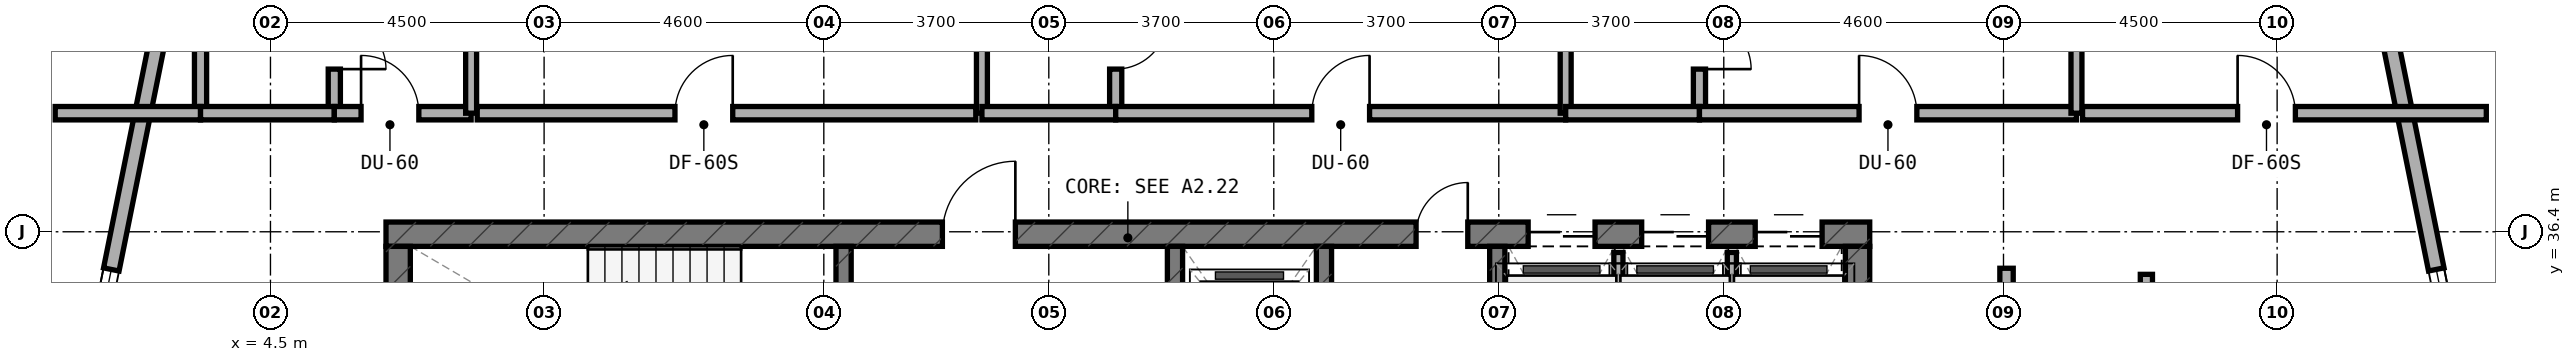
"""IFC4 building model, lengths in metres.
Left out: names, types, materials, properties, quantities, classifications, styles, units other than length and angle.
Written with IfcOpenShell. Run it as: python <this file> out.ifc"""

import sys

from ifc_helpers import new_model, si_unit, direction, frame, frame_2d, origin, place, context, subcontext, project, spatial, rectangle, extrude, element, fill, save


model = new_model("IFC4")
c1 = context("Model", 3, precision=1e-05, world=origin(), true_north=direction((0.0, 1.0)))
c2 = subcontext(c1, "Body", "Model", "MODEL_VIEW")
j1 = project(units=[si_unit("LENGTHUNIT", "METRE"), si_unit("PLANEANGLEUNIT", "RADIAN")], contexts=[c1])
p1 = place(None, origin())
s1 = spatial("IfcSite", under=j1, at=p1, CompositionType="ELEMENT")
p2 = place(p1, origin())
s2 = spatial("IfcBuilding", under=s1, at=p2, CompositionType="ELEMENT")
p3 = place(p2, frame((0.0, 0.0, 95.0)))
s3 = spatial("IfcBuildingStorey", under=s2, at=p3, CompositionType="ELEMENT", Elevation=95.0)
p4 = place(p3, frame((6.4, 36.36, 0.0), z_axis=(0.0, 0.0, 1.0), x_axis=(1.0, 0.0, 0.0)))
e1 = element("IfcWall", 1, at=p4, inside=s3, PredefinedType="SHEAR", context=c2, shape_type="SweptSolid", body=[
    extrude(rectangle(XDim=24.4, YDim=0.4, at=frame_2d((12.2, 0.0))), origin(), (0.0, 0.0, 1.0), 3.5),
])
p5 = place(p4, frame((9.15, 0.0, 0.0)))
e2 = element("IfcOpeningElement", 2, at=p5, cuts=e1, PredefinedType="OPENING", context=c2, shape_type="SweptSolid", body=[
    extrude(rectangle(XDim=1.2, YDim=2.15, at=frame_2d((0.6, 1.075))), frame((0.0, 0.21, 0.0), z_axis=(0.0, -1.0, 0.0), x_axis=(1.0, 0.0, 0.0)), (0.0, 0.0, 1.0), 0.42),
])
p6 = place(p4, frame((16.94, 0.0, 0.0)))
e3 = element("IfcOpeningElement", 3, at=p6, cuts=e1, PredefinedType="OPENING", context=c2, shape_type="SweptSolid", body=[
    extrude(rectangle(XDim=0.85, YDim=2.1, at=frame_2d((0.425, 1.05))), frame((0.0, 0.21, 0.0), z_axis=(0.0, -1.0, 0.0), x_axis=(1.0, 0.0, 0.0)), (0.0, 0.0, 1.0), 0.42),
])
p7 = place(p4, frame((18.783, 0.0, 0.0)))
e4 = element("IfcOpeningElement", 4, at=p7, cuts=e1, PredefinedType="OPENING", context=c2, shape_type="SweptSolid", body=[
    extrude(rectangle(XDim=1.1, YDim=2.15, at=frame_2d((0.55, 1.075))), frame((0.0, 0.21, 0.0), z_axis=(0.0, -1.0, 0.0), x_axis=(1.0, 0.0, 0.0)), (0.0, 0.0, 1.0), 0.42),
])
p8 = place(p4, frame((20.65, 0.0, 0.0)))
e5 = element("IfcOpeningElement", 5, at=p8, cuts=e1, PredefinedType="OPENING", context=c2, shape_type="SweptSolid", body=[
    extrude(rectangle(XDim=1.1, YDim=2.15, at=frame_2d((0.55, 1.075))), frame((0.0, 0.21, 0.0), z_axis=(0.0, -1.0, 0.0), x_axis=(1.0, 0.0, 0.0)), (0.0, 0.0, 1.0), 0.42),
])
p9 = place(p4, frame((22.517, 0.0, 0.0)))
e6 = element("IfcOpeningElement", 6, at=p9, cuts=e1, PredefinedType="OPENING", context=c2, shape_type="SweptSolid", body=[
    extrude(rectangle(XDim=1.1, YDim=2.15, at=frame_2d((0.55, 1.075))), frame((0.0, 0.21, 0.0), z_axis=(0.0, -1.0, 0.0), x_axis=(1.0, 0.0, 0.0)), (0.0, 0.0, 1.0), 0.42),
])
for number, where, z_axis, x_axis in (
    (7, (6.6, 33.0, 0.0), (0.0, 0.0, 1.0), (0.0, 1.0, 0.0)),
    (8, (30.6, 33.0, 0.0), (0.0, 0.0, 1.0), (0.0, 1.0, 0.0)),
):
    element("IfcWall", number, at=place(p3, frame(where, z_axis=z_axis, x_axis=x_axis)), inside=s3, PredefinedType="SHEAR", context=c2, shape_type="SweptSolid", body=[
        extrude(rectangle(XDim=3.16, YDim=0.4, at=frame_2d((1.58, 0.0))), origin(), (0.0, 0.0, 1.0), 3.5),
    ])
p10 = place(p3, frame((13.925, 33.0, 0.0), z_axis=(0.0, 0.0, 1.0), x_axis=(0.0, 1.0, 0.0)))
e9 = element("IfcWall", 9, at=p10, inside=s3, PredefinedType="STANDARD", context=c2, shape_type="SweptSolid", body=[
    extrude(rectangle(XDim=3.16, YDim=0.25, at=frame_2d((1.58, 0.0))), origin(), (0.0, 0.0, 1.0), 3.22),
])
p11 = place(p10, frame((0.98, 0.0, 0.0)))
e10 = element("IfcOpeningElement", 10, at=p11, cuts=e9, PredefinedType="OPENING", context=c2, shape_type="SweptSolid", body=[
    extrude(rectangle(XDim=1.1, YDim=2.15, at=frame_2d((0.55, 1.075))), frame((0.0, 0.135, 0.0), z_axis=(0.0, -1.0, 0.0), x_axis=(1.0, 0.0, 0.0)), (0.0, 0.0, 1.0), 0.27),
])
p12 = place(p3, frame((19.375, 33.0, 0.0), z_axis=(0.0, 0.0, 1.0), x_axis=(0.0, 1.0, 0.0)))
e11 = element("IfcWall", 11, at=p12, inside=s3, PredefinedType="STANDARD", context=c2, shape_type="SweptSolid", body=[
    extrude(rectangle(XDim=3.16, YDim=0.25, at=frame_2d((1.58, 0.0))), origin(), (0.0, 0.0, 1.0), 3.22),
])
p13 = place(p12, frame((0.98, 0.0, 0.0)))
e12 = element("IfcOpeningElement", 12, at=p13, cuts=e11, PredefinedType="OPENING", context=c2, shape_type="SweptSolid", body=[
    extrude(rectangle(XDim=1.1, YDim=2.15, at=frame_2d((0.55, 1.075))), frame((0.0, 0.135, 0.0), z_axis=(0.0, -1.0, 0.0), x_axis=(1.0, 0.0, 0.0)), (0.0, 0.0, 1.0), 0.27),
])
for number, where, z_axis, x_axis in (
    (13, (21.825, 33.0, 0.0), (0.0, 0.0, 1.0), (0.0, 1.0, 0.0)),
    (14, (24.675, 33.0, 0.0), (0.0, 0.0, 1.0), (0.0, 1.0, 0.0)),
):
    element("IfcWall", number, at=place(p3, frame(where, z_axis=z_axis, x_axis=x_axis)), inside=s3, PredefinedType="STANDARD", context=c2, shape_type="SweptSolid", body=[
        extrude(rectangle(XDim=3.16, YDim=0.25, at=frame_2d((1.58, 0.0))), origin(), (0.0, 0.0, 1.0), 3.22),
    ])
p14 = place(p3, frame((41.084, 30.98, 0.0), z_axis=(0.0, 0.0, 1.0), x_axis=(-0.197435082048, 0.980315963543, 0.0)))
e15 = element("IfcWall", 15, at=p14, inside=s3, PredefinedType="STANDARD", context=c2, shape_type="SweptSolid", body=[
    extrude(rectangle(XDim=9.183, YDim=0.26, at=frame_2d((4.591, 0.0))), origin(), (0.0, 0.0, 1.0), 3.22),
])
p15 = place(p14, frame((2.497, 0.0, 0.8)))
e16 = element("IfcOpeningElement", 16, at=p15, cuts=e15, PredefinedType="OPENING", context=c2, shape_type="SweptSolid", body=[
    extrude(rectangle(XDim=2.4, YDim=1.6, at=frame_2d((1.2, 0.8))), frame((0.0, 0.14, 0.0), z_axis=(0.0, -1.0, 0.0), x_axis=(1.0, 0.0, 0.0)), (0.0, 0.0, 1.0), 0.28),
])
p16 = place(p3, frame((2.729, 39.982, 0.0), z_axis=(0.0, 0.0, 1.0), x_axis=(-0.197435082048, -0.980315963543, 0.0)))
e17 = element("IfcWall", 17, at=p16, inside=s3, PredefinedType="STANDARD", context=c2, shape_type="SweptSolid", body=[
    extrude(rectangle(XDim=9.183, YDim=0.26, at=frame_2d((4.591, 0.0))), origin(), (0.0, 0.0, 1.0), 3.22),
])
p17 = place(p16, frame((4.286, 0.0, 0.8)))
e18 = element("IfcOpeningElement", 18, at=p17, cuts=e17, PredefinedType="OPENING", context=c2, shape_type="SweptSolid", body=[
    extrude(rectangle(XDim=2.4, YDim=1.6, at=frame_2d((1.2, 0.8))), frame((0.0, 0.14, 0.0), z_axis=(0.0, -1.0, 0.0), x_axis=(1.0, 0.0, 0.0)), (0.0, 0.0, 1.0), 0.28),
])
p18 = place(p3, frame((26.667, 33.1, 0.0), z_axis=(0.0, 0.0, 1.0), x_axis=(0.0, 1.0, 0.0)))
e19 = element("IfcWall", 19, at=p18, inside=s3, PredefinedType="PARTITIONING", context=c2, shape_type="SweptSolid", body=[
    extrude(rectangle(XDim=2.96, YDim=0.15, at=frame_2d((1.48, 0.0))), origin(), (0.0, 0.0, 1.0), 3.22),
])
p19 = place(p3, frame((28.533, 33.1, 0.0), z_axis=(0.0, 0.0, 1.0), x_axis=(0.0, 1.0, 0.0)))
e20 = element("IfcWall", 20, at=p19, inside=s3, PredefinedType="PARTITIONING", context=c2, shape_type="SweptSolid", body=[
    extrude(rectangle(XDim=2.96, YDim=0.15, at=frame_2d((1.48, 0.0))), origin(), (0.0, 0.0, 1.0), 2.595),
])
p20 = place(p3, frame((5.55, 38.45, 0.0), z_axis=(0.0, 0.0, 1.0), x_axis=(0.0, 1.0, 0.0)))
e21 = element("IfcWall", 21, at=p20, inside=s3, PredefinedType="PLUMBINGWALL", context=c2, shape_type="SweptSolid", body=[
    extrude(rectangle(XDim=2.1, YDim=0.2, at=frame_2d((1.05, 0.0))), origin(), (0.0, 0.0, 1.0), 3.22),
])
p21 = place(p20, frame((0.625, 0.0, 0.0)))
e22 = element("IfcOpeningElement", 22, at=p21, cuts=e21, PredefinedType="OPENING", context=c2, shape_type="SweptSolid", body=[
    extrude(rectangle(XDim=0.85, YDim=2.1, at=frame_2d((0.425, 1.05))), frame((0.0, 0.11, 0.0), z_axis=(0.0, -1.0, 0.0), x_axis=(1.0, 0.0, 0.0)), (0.0, 0.0, 1.0), 0.22),
])
p22 = place(p3, frame((3.35, 38.45, 0.0), z_axis=(0.0, 0.0, 1.0), x_axis=(0.0, 1.0, 0.0)))
e23 = element("IfcWall", 23, at=p22, inside=s3, PredefinedType="PLUMBINGWALL", context=c2, shape_type="SweptSolid", body=[
    extrude(rectangle(XDim=2.1, YDim=0.2, at=frame_2d((1.05, 0.0))), origin(), (0.0, 0.0, 1.0), 3.22),
])
p23 = place(p3, frame((0.96, 38.35, 0.0), z_axis=(0.0, 0.0, 1.0), x_axis=(1.0, 0.0, 0.0)))
e24 = element("IfcWall", 24, at=p23, inside=s3, PredefinedType="SOLIDWALL", context=c2, shape_type="SweptSolid", body=[
    extrude(rectangle(XDim=2.39, YDim=0.22, at=frame_2d((1.195, 0.0))), origin(), (0.0, 0.0, 1.0), 3.22),
])
p24 = place(p3, frame((3.35, 38.35, 0.0), z_axis=(0.0, 0.0, 1.0), x_axis=(1.0, 0.0, 0.0)))
e25 = element("IfcWall", 25, at=p24, inside=s3, PredefinedType="SOLIDWALL", context=c2, shape_type="SweptSolid", body=[
    extrude(rectangle(XDim=2.2, YDim=0.22, at=frame_2d((1.1, 0.0))), origin(), (0.0, 0.0, 1.0), 3.22),
])
p25 = place(p3, frame((5.55, 38.35, 0.0), z_axis=(0.0, 0.0, 1.0), x_axis=(1.0, 0.0, 0.0)))
e26 = element("IfcWall", 26, at=p25, inside=s3, PredefinedType="SOLIDWALL", context=c2, shape_type="SweptSolid", body=[
    extrude(rectangle(XDim=2.25, YDim=0.22, at=frame_2d((1.125, 0.0))), origin(), (0.0, 0.0, 1.0), 2.595),
])
p26 = place(p25, frame((0.44, 0.0, 0.0)))
e27 = element("IfcOpeningElement", 27, at=p26, cuts=e26, PredefinedType="OPENING", context=c2, shape_type="SweptSolid", body=[
    extrude(rectangle(XDim=0.95, YDim=2.1, at=frame_2d((0.475, 1.05))), frame((0.0, 0.12, 0.0), z_axis=(0.0, -1.0, 0.0), x_axis=(1.0, 0.0, 0.0)), (0.0, 0.0, 1.0), 0.24),
])
p27 = place(p3, frame((7.8, 38.35, 0.0), z_axis=(0.0, 0.0, 1.0), x_axis=(0.0, 1.0, 0.0)))
e28 = element("IfcWall", 28, at=p27, inside=s3, PredefinedType="SOLIDWALL", context=c2, shape_type="SweptSolid", body=[
    extrude(rectangle(XDim=5.351, YDim=0.18, at=frame_2d((2.675, 0.0))), origin(), (0.0, 0.0, 1.0), 2.595),
])
p28 = place(p3, frame((7.9, 38.35, 0.0), z_axis=(0.0, 0.0, 1.0), x_axis=(1.0, 0.0, 0.0)))
e29 = element("IfcWall", 29, at=p28, inside=s3, PredefinedType="SOLIDWALL", context=c2, shape_type="SweptSolid", body=[
    extrude(rectangle(XDim=8.2, YDim=0.22, at=frame_2d((4.1, 0.0))), origin(), (0.0, 0.0, 1.0), 3.22),
])
p29 = place(p28, frame((3.252, 0.0, 0.0)))
e30 = element("IfcOpeningElement", 30, at=p29, cuts=e29, PredefinedType="OPENING", context=c2, shape_type="SweptSolid", body=[
    extrude(rectangle(XDim=0.95, YDim=2.1, at=frame_2d((0.475, 1.05))), frame((0.0, 0.12, 0.0), z_axis=(0.0, -1.0, 0.0), x_axis=(1.0, 0.0, 0.0)), (0.0, 0.0, 1.0), 0.24),
])
p30 = place(p3, frame((16.2, 38.35, 0.0), z_axis=(0.0, 0.0, 1.0), x_axis=(0.0, 1.0, 0.0)))
e31 = element("IfcWall", 31, at=p30, inside=s3, PredefinedType="SOLIDWALL", context=c2, shape_type="SweptSolid", body=[
    extrude(rectangle(XDim=6.79, YDim=0.18, at=frame_2d((3.395, 0.0))), origin(), (0.0, 0.0, 1.0), 2.595),
])
p31 = place(p3, frame((18.4, 38.45, 0.0), z_axis=(0.0, 0.0, 1.0), x_axis=(0.0, 1.0, 0.0)))
e32 = element("IfcWall", 32, at=p31, inside=s3, PredefinedType="PLUMBINGWALL", context=c2, shape_type="SweptSolid", body=[
    extrude(rectangle(XDim=2.1, YDim=0.2, at=frame_2d((1.05, 0.0))), origin(), (0.0, 0.0, 1.0), 2.835),
])
p32 = place(p31, frame((0.625, 0.0, 0.0)))
e33 = element("IfcOpeningElement", 33, at=p32, cuts=e32, PredefinedType="OPENING", context=c2, shape_type="SweptSolid", body=[
    extrude(rectangle(XDim=0.85, YDim=2.1, at=frame_2d((0.425, 1.05))), frame((0.0, 0.11, 0.0), z_axis=(0.0, -1.0, 0.0), x_axis=(1.0, 0.0, 0.0)), (0.0, 0.0, 1.0), 0.22),
])
p33 = place(p3, frame((16.2, 38.35, 0.0), z_axis=(0.0, 0.0, 1.0), x_axis=(1.0, 0.0, 0.0)))
e34 = element("IfcWall", 34, at=p33, inside=s3, PredefinedType="SOLIDWALL", context=c2, shape_type="SweptSolid", body=[
    extrude(rectangle(XDim=2.2, YDim=0.22, at=frame_2d((1.1, 0.0))), origin(), (0.0, 0.0, 1.0), 2.595),
])
p34 = place(p3, frame((18.4, 38.35, 0.0), z_axis=(0.0, 0.0, 1.0), x_axis=(1.0, 0.0, 0.0)))
e35 = element("IfcWall", 35, at=p34, inside=s3, PredefinedType="SOLIDWALL", context=c2, shape_type="SweptSolid", body=[
    extrude(rectangle(XDim=7.4, YDim=0.22, at=frame_2d((3.7, 0.0))), origin(), (0.0, 0.0, 1.0), 2.595),
])
p35 = place(p34, frame((3.225, 0.0, 0.0)))
e36 = element("IfcOpeningElement", 36, at=p35, cuts=e35, PredefinedType="OPENING", context=c2, shape_type="SweptSolid", body=[
    extrude(rectangle(XDim=0.95, YDim=2.1, at=frame_2d((0.475, 1.05))), frame((0.0, 0.12, 0.0), z_axis=(0.0, -1.0, 0.0), x_axis=(1.0, 0.0, 0.0)), (0.0, 0.0, 1.0), 0.24),
])
p36 = place(p3, frame((25.8, 38.35, 0.0), z_axis=(0.0, 0.0, 1.0), x_axis=(0.0, 1.0, 0.0)))
e37 = element("IfcWall", 37, at=p36, inside=s3, PredefinedType="SOLIDWALL", context=c2, shape_type="SweptSolid", body=[
    extrude(rectangle(XDim=6.79, YDim=0.18, at=frame_2d((3.395, 0.0))), origin(), (0.0, 0.0, 1.0), 2.595),
])
p37 = place(p3, frame((28.0, 38.45, 0.0), z_axis=(0.0, 0.0, 1.0), x_axis=(0.0, 1.0, 0.0)))
e38 = element("IfcWall", 38, at=p37, inside=s3, PredefinedType="PLUMBINGWALL", context=c2, shape_type="SweptSolid", body=[
    extrude(rectangle(XDim=2.1, YDim=0.2, at=frame_2d((1.05, 0.0))), origin(), (0.0, 0.0, 1.0), 2.835),
])
p38 = place(p37, frame((0.625, 0.0, 0.0)))
e39 = element("IfcOpeningElement", 39, at=p38, cuts=e38, PredefinedType="OPENING", context=c2, shape_type="SweptSolid", body=[
    extrude(rectangle(XDim=0.85, YDim=2.1, at=frame_2d((0.425, 1.05))), frame((0.0, 0.11, 0.0), z_axis=(0.0, -1.0, 0.0), x_axis=(1.0, 0.0, 0.0)), (0.0, 0.0, 1.0), 0.22),
])
p39 = place(p3, frame((25.8, 38.35, 0.0), z_axis=(0.0, 0.0, 1.0), x_axis=(1.0, 0.0, 0.0)))
e40 = element("IfcWall", 40, at=p39, inside=s3, PredefinedType="SOLIDWALL", context=c2, shape_type="SweptSolid", body=[
    extrude(rectangle(XDim=2.2, YDim=0.22, at=frame_2d((1.1, 0.0))), origin(), (0.0, 0.0, 1.0), 2.595),
])
p40 = place(p3, frame((28.0, 38.35, 0.0), z_axis=(0.0, 0.0, 1.0), x_axis=(1.0, 0.0, 0.0)))
e41 = element("IfcWall", 41, at=p40, inside=s3, PredefinedType="SOLIDWALL", context=c2, shape_type="SweptSolid", body=[
    extrude(rectangle(XDim=6.2, YDim=0.22, at=frame_2d((3.1, 0.0))), origin(), (0.0, 0.0, 1.0), 2.595),
])
p41 = place(p40, frame((2.625, 0.0, 0.0)))
e42 = element("IfcOpeningElement", 42, at=p41, cuts=e41, PredefinedType="OPENING", context=c2, shape_type="SweptSolid", body=[
    extrude(rectangle(XDim=0.95, YDim=2.1, at=frame_2d((0.475, 1.05))), frame((0.0, 0.12, 0.0), z_axis=(0.0, -1.0, 0.0), x_axis=(1.0, 0.0, 0.0)), (0.0, 0.0, 1.0), 0.24),
])
p42 = place(p3, frame((34.2, 38.35, 0.0), z_axis=(0.0, 0.0, 1.0), x_axis=(0.0, 1.0, 0.0)))
e43 = element("IfcWall", 43, at=p42, inside=s3, PredefinedType="SOLIDWALL", context=c2, shape_type="SweptSolid", body=[
    extrude(rectangle(XDim=5.351, YDim=0.18, at=frame_2d((2.675, 0.0))), origin(), (0.0, 0.0, 1.0), 2.595),
])
p43 = place(p3, frame((34.3, 38.35, 0.0), z_axis=(0.0, 0.0, 1.0), x_axis=(1.0, 0.0, 0.0)))
e44 = element("IfcWall", 44, at=p43, inside=s3, PredefinedType="SOLIDWALL", context=c2, shape_type="SweptSolid", body=[
    extrude(rectangle(XDim=6.64, YDim=0.22, at=frame_2d((3.32, 0.0))), origin(), (0.0, 0.0, 1.0), 2.835),
])
p44 = place(p43, frame((2.55, 0.0, 0.0)))
e45 = element("IfcOpeningElement", 45, at=p44, cuts=e44, PredefinedType="OPENING", context=c2, shape_type="SweptSolid", body=[
    extrude(rectangle(XDim=0.95, YDim=2.1, at=frame_2d((0.475, 1.05))), frame((0.0, 0.12, 0.0), z_axis=(0.0, -1.0, 0.0), x_axis=(1.0, 0.0, 0.0)), (0.0, 0.0, 1.0), 0.24),
])
p45 = place(p3, frame((35.35, 33.7, 0.0), z_axis=(0.0, 0.0, 1.0), x_axis=(0.0, 1.0, 0.0)))
e46 = element("IfcWall", 46, at=p45, inside=s3, PredefinedType="PLUMBINGWALL", context=c2, shape_type="SweptSolid", body=[
    extrude(rectangle(XDim=2.0, YDim=0.2, at=frame_2d((1.0, 0.0))), origin(), (0.0, 0.0, 1.0), 2.835),
])
p46 = place(p3, frame((33.05, 33.6, 0.0), z_axis=(0.0, 0.0, 1.0), x_axis=(0.0, 1.0, 0.0)))
e47 = element("IfcWall", 47, at=p46, inside=s3, PredefinedType="SOLIDWALL", context=c2, shape_type="SweptSolid", body=[
    extrude(rectangle(XDim=2.2, YDim=0.22, at=frame_2d((1.1, 0.0))), origin(), (0.0, 0.0, 1.0), 3.22),
])
p47 = place(p15, origin())
e48 = element("IfcWindow", 48, at=p47, inside=s3, PartitioningType="SINGLE_PANEL", PredefinedType="WINDOW", context=c2, shape_type="SweptSolid", body=[
    extrude(rectangle(XDim=2.4, YDim=1.6, at=frame_2d((1.2, 0.8))), frame((0.0, 0.03, 0.0), z_axis=(0.0, -1.0, 0.0), x_axis=(1.0, 0.0, 0.0)), (0.0, 0.0, 1.0), 0.06),
])
fill(e16, e48)
p48 = place(p17, origin())
e49 = element("IfcWindow", 49, at=p48, inside=s3, PartitioningType="SINGLE_PANEL", PredefinedType="WINDOW", context=c2, shape_type="SweptSolid", body=[
    extrude(rectangle(XDim=2.4, YDim=1.6, at=frame_2d((1.2, 0.8))), frame((0.0, 0.03, 0.0), z_axis=(0.0, -1.0, 0.0), x_axis=(1.0, 0.0, 0.0)), (0.0, 0.0, 1.0), 0.06),
])
fill(e18, e49)
p49 = place(p5, origin())
e50 = element("IfcDoor", 50, at=p49, inside=s3, OperationType="SINGLE_SWING_RIGHT", PredefinedType="DOOR", context=c2, shape_type="SweptSolid", body=[
    extrude(rectangle(XDim=1.2, YDim=2.15, at=frame_2d((0.6, 1.075))), frame((0.0, 0.025, 0.0), z_axis=(0.0, -1.0, 0.0), x_axis=(1.0, 0.0, 0.0)), (0.0, 0.0, 1.0), 0.05),
])
fill(e2, e50)
p50 = place(p6, origin())
e51 = element("IfcDoor", 51, at=p50, inside=s3, OperationType="SINGLE_SWING_RIGHT", PredefinedType="DOOR", context=c2, shape_type="SweptSolid", body=[
    extrude(rectangle(XDim=0.85, YDim=2.1, at=frame_2d((0.425, 1.05))), frame((0.0, 0.025, 0.0), z_axis=(0.0, -1.0, 0.0), x_axis=(1.0, 0.0, 0.0)), (0.0, 0.0, 1.0), 0.05),
])
fill(e3, e51)
p51 = place(p7, origin())
e52 = element("IfcDoor", 52, at=p51, inside=s3, OperationType="DOUBLE_DOOR_SLIDING", PredefinedType="DOOR", context=c2, shape_type="SweptSolid", body=[
    extrude(rectangle(XDim=1.1, YDim=2.15, at=frame_2d((0.55, 1.075))), frame((0.0, 0.025, 0.0), z_axis=(0.0, -1.0, 0.0), x_axis=(1.0, 0.0, 0.0)), (0.0, 0.0, 1.0), 0.05),
])
fill(e4, e52)
p52 = place(p8, origin())
e53 = element("IfcDoor", 53, at=p52, inside=s3, OperationType="DOUBLE_DOOR_SLIDING", PredefinedType="DOOR", context=c2, shape_type="SweptSolid", body=[
    extrude(rectangle(XDim=1.1, YDim=2.15, at=frame_2d((0.55, 1.075))), frame((0.0, 0.025, 0.0), z_axis=(0.0, -1.0, 0.0), x_axis=(1.0, 0.0, 0.0)), (0.0, 0.0, 1.0), 0.05),
])
fill(e5, e53)
p53 = place(p9, origin())
e54 = element("IfcDoor", 54, at=p53, inside=s3, OperationType="DOUBLE_DOOR_SLIDING", PredefinedType="DOOR", context=c2, shape_type="SweptSolid", body=[
    extrude(rectangle(XDim=1.1, YDim=2.15, at=frame_2d((0.55, 1.075))), frame((0.0, 0.025, 0.0), z_axis=(0.0, -1.0, 0.0), x_axis=(1.0, 0.0, 0.0)), (0.0, 0.0, 1.0), 0.05),
])
fill(e6, e54)
p54 = place(p21, frame((0.85, 0.0, 0.0), z_axis=(0.0, 0.0, 1.0), x_axis=(-1.0, 0.0, 0.0)))
e55 = element("IfcDoor", 55, at=p54, inside=s3, OperationType="SINGLE_SWING_RIGHT", PredefinedType="DOOR", context=c2, shape_type="SweptSolid", body=[
    extrude(rectangle(XDim=0.85, YDim=2.1, at=frame_2d((0.425, 1.05))), frame((0.0, 0.025, 0.0), z_axis=(0.0, -1.0, 0.0), x_axis=(1.0, 0.0, 0.0)), (0.0, 0.0, 1.0), 0.05),
])
fill(e22, e55)
p55 = place(p26, origin())
e56 = element("IfcDoor", 56, at=p55, inside=s3, OperationType="SINGLE_SWING_LEFT", PredefinedType="DOOR", context=c2, shape_type="SweptSolid", body=[
    extrude(rectangle(XDim=0.95, YDim=2.1, at=frame_2d((0.475, 1.05))), frame((0.0, 0.025, 0.0), z_axis=(0.0, -1.0, 0.0), x_axis=(1.0, 0.0, 0.0)), (0.0, 0.0, 1.0), 0.05),
])
fill(e27, e56)
p56 = place(p29, origin())
e57 = element("IfcDoor", 57, at=p56, inside=s3, OperationType="SINGLE_SWING_RIGHT", PredefinedType="DOOR", context=c2, shape_type="SweptSolid", body=[
    extrude(rectangle(XDim=0.95, YDim=2.1, at=frame_2d((0.475, 1.05))), frame((0.0, 0.025, 0.0), z_axis=(0.0, -1.0, 0.0), x_axis=(1.0, 0.0, 0.0)), (0.0, 0.0, 1.0), 0.05),
])
fill(e30, e57)
p57 = place(p32, frame((0.85, 0.0, 0.0), z_axis=(0.0, 0.0, 1.0), x_axis=(-1.0, 0.0, 0.0)))
e58 = element("IfcDoor", 58, at=p57, inside=s3, OperationType="SINGLE_SWING_LEFT", PredefinedType="DOOR", context=c2, shape_type="SweptSolid", body=[
    extrude(rectangle(XDim=0.85, YDim=2.1, at=frame_2d((0.425, 1.05))), frame((0.0, 0.025, 0.0), z_axis=(0.0, -1.0, 0.0), x_axis=(1.0, 0.0, 0.0)), (0.0, 0.0, 1.0), 0.05),
])
fill(e33, e58)
p58 = place(p35, origin())
e59 = element("IfcDoor", 59, at=p58, inside=s3, OperationType="SINGLE_SWING_RIGHT", PredefinedType="DOOR", context=c2, shape_type="SweptSolid", body=[
    extrude(rectangle(XDim=0.95, YDim=2.1, at=frame_2d((0.475, 1.05))), frame((0.0, 0.025, 0.0), z_axis=(0.0, -1.0, 0.0), x_axis=(1.0, 0.0, 0.0)), (0.0, 0.0, 1.0), 0.05),
])
fill(e36, e59)
p59 = place(p38, frame((0.85, 0.0, 0.0), z_axis=(0.0, 0.0, 1.0), x_axis=(-1.0, 0.0, 0.0)))
e60 = element("IfcDoor", 60, at=p59, inside=s3, OperationType="SINGLE_SWING_RIGHT", PredefinedType="DOOR", context=c2, shape_type="SweptSolid", body=[
    extrude(rectangle(XDim=0.85, YDim=2.1, at=frame_2d((0.425, 1.05))), frame((0.0, 0.025, 0.0), z_axis=(0.0, -1.0, 0.0), x_axis=(1.0, 0.0, 0.0)), (0.0, 0.0, 1.0), 0.05),
])
fill(e39, e60)
p60 = place(p41, origin())
e61 = element("IfcDoor", 61, at=p60, inside=s3, OperationType="SINGLE_SWING_LEFT", PredefinedType="DOOR", context=c2, shape_type="SweptSolid", body=[
    extrude(rectangle(XDim=0.95, YDim=2.1, at=frame_2d((0.475, 1.05))), frame((0.0, 0.025, 0.0), z_axis=(0.0, -1.0, 0.0), x_axis=(1.0, 0.0, 0.0)), (0.0, 0.0, 1.0), 0.05),
])
fill(e42, e61)
p61 = place(p44, origin())
e62 = element("IfcDoor", 62, at=p61, inside=s3, OperationType="SINGLE_SWING_LEFT", PredefinedType="DOOR", context=c2, shape_type="SweptSolid", body=[
    extrude(rectangle(XDim=0.95, YDim=2.1, at=frame_2d((0.475, 1.05))), frame((0.0, 0.025, 0.0), z_axis=(0.0, -1.0, 0.0), x_axis=(1.0, 0.0, 0.0)), (0.0, 0.0, 1.0), 0.05),
])
fill(e45, e62)
save(model, sys.argv[1])
